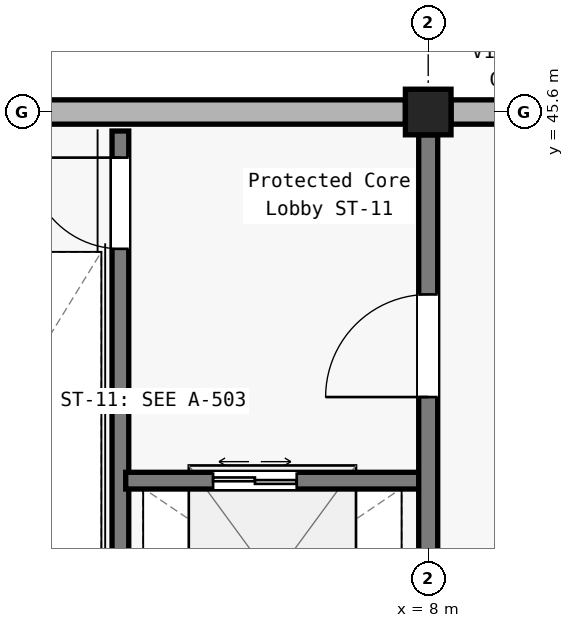
"""IFC4 building model, lengths in metres.
Left out: names, types, materials, properties, quantities, classifications, styles, units other than length and angle.
Written with IfcOpenShell. Run it as: python <this file> out.ifc"""

import sys

from ifc_helpers import new_model, si_unit, direction, frame, frame_2d, origin, origin_2d, place, context, subcontext, project, spatial, rectangle, extrude, element, fill, save


model = new_model("IFC4")
c1 = context("Model", 3, precision=1e-05, world=origin(), true_north=direction((0.0, 1.0)))
c2 = subcontext(c1, "Body", "Model", "MODEL_VIEW")
j1 = project(units=[si_unit("LENGTHUNIT", "METRE"), si_unit("PLANEANGLEUNIT", "RADIAN")], contexts=[c1])
p1 = place(None, origin())
s1 = spatial("IfcSite", under=j1, at=p1, CompositionType="ELEMENT")
p2 = place(p1, origin())
s2 = spatial("IfcBuilding", under=s1, at=p2, CompositionType="ELEMENT")
p3 = place(p2, frame((0.0, 0.0, 19.8)))
s3 = spatial("IfcBuildingStorey", under=s2, at=p3, CompositionType="ELEMENT", Elevation=19.8)
p4 = place(p3, frame((8.0, 45.6, 0.0), z_axis=(0.0, 0.0, 1.0), x_axis=(1.0, 0.0, 0.0)))
e1 = element("IfcColumn", 1, at=p4, inside=s3, PredefinedType="COLUMN", context=c2, shape_type="SweptSolid", body=[
    extrude(rectangle(XDim=0.6, YDim=0.6, at=origin_2d()), origin(), (0.0, 0.0, 1.0), 7.0),
])
for number, where, z_axis, x_axis in (
    (2, (0.25, 45.6, 0.0), (0.0, 0.0, 1.0), (1.0, 0.0, 0.0)),
    (3, (8.3, 45.6, 0.0), (0.0, 0.0, 1.0), (1.0, 0.0, 0.0)),
):
    element("IfcWall", number, at=place(p3, frame(where, z_axis=z_axis, x_axis=x_axis)), inside=s3, PredefinedType="SOLIDWALL", context=c2, shape_type="SweptSolid", body=[
        extrude(rectangle(XDim=7.45, YDim=0.32, at=frame_2d((3.725, 0.0))), origin(), (0.0, 0.0, 1.0), 6.05),
    ])
p5 = place(p3, frame((3.95, 38.25, 0.0), z_axis=(0.0, 0.0, 1.0), x_axis=(0.0, 1.0, 0.0)))
e4 = element("IfcWall", 4, at=p5, inside=s3, PredefinedType="SOLIDWALL", context=c2, shape_type="SweptSolid", body=[
    extrude(rectangle(XDim=7.1, YDim=0.22, at=frame_2d((3.55, 0.0))), origin(), (0.0, 0.0, 1.0), 4.54),
])
p6 = place(p5, frame((5.55, 0.0, 0.0)))
e5 = element("IfcOpeningElement", 5, at=p6, cuts=e4, PredefinedType="OPENING", context=c2, shape_type="SweptSolid", body=[
    extrude(rectangle(XDim=1.2, YDim=2.15, at=frame_2d((0.6, 1.075))), frame((0.0, 0.12, 0.0), z_axis=(0.0, -1.0, 0.0), x_axis=(1.0, 0.0, 0.0)), (0.0, 0.0, 1.0), 0.24),
])
p7 = place(p3, frame((4.02, 40.75, 0.0), z_axis=(0.0, 0.0, 1.0), x_axis=(1.0, 0.0, 0.0)))
e6 = element("IfcWall", 6, at=p7, inside=s3, PredefinedType="SOLIDWALL", context=c2, shape_type="SweptSolid", body=[
    extrude(rectangle(XDim=3.93, YDim=0.22, at=frame_2d((1.965, 0.0))), origin(), (0.0, 0.0, 1.0), 4.54),
])
p8 = place(p7, frame((1.15, 0.0, 0.0)))
e7 = element("IfcOpeningElement", 7, at=p8, cuts=e6, PredefinedType="OPENING", context=c2, shape_type="SweptSolid", body=[
    extrude(rectangle(XDim=1.1, YDim=2.2, at=frame_2d((0.55, 1.1))), frame((0.0, 0.12, 0.0), z_axis=(0.0, -1.0, 0.0), x_axis=(1.0, 0.0, 0.0)), (0.0, 0.0, 1.0), 0.24),
])
p9 = place(p3, frame((8.0, 38.375, 0.0), z_axis=(0.0, 0.0, 1.0), x_axis=(0.0, 1.0, 0.0)))
e8 = element("IfcWall", 8, at=p9, inside=s3, PredefinedType="SOLIDWALL", context=c2, shape_type="SweptSolid", body=[
    extrude(rectangle(XDim=6.925, YDim=0.25, at=frame_2d((3.462, 0.0))), origin(), (0.0, 0.0, 1.0), 4.54),
])
p10 = place(p9, frame((3.475, 0.0, 0.0)))
e9 = element("IfcOpeningElement", 9, at=p10, cuts=e8, PredefinedType="OPENING", context=c2, shape_type="SweptSolid", body=[
    extrude(rectangle(XDim=1.35, YDim=2.2, at=frame_2d((0.675, 1.1))), frame((0.0, 0.135, 0.0), z_axis=(0.0, -1.0, 0.0), x_axis=(1.0, 0.0, 0.0)), (0.0, 0.0, 1.0), 0.27),
])
p11 = place(p6, origin())
e10 = element("IfcDoor", 10, at=p11, inside=s3, OperationType="SINGLE_SWING_RIGHT", PredefinedType="DOOR", context=c2, shape_type="SweptSolid", body=[
    extrude(rectangle(XDim=1.2, YDim=2.15, at=frame_2d((0.6, 1.075))), frame((0.0, 0.025, 0.0), z_axis=(0.0, -1.0, 0.0), x_axis=(1.0, 0.0, 0.0)), (0.0, 0.0, 1.0), 0.05),
])
fill(e5, e10)
p12 = place(p8, origin())
e11 = element("IfcDoor", 11, at=p12, inside=s3, OperationType="DOUBLE_DOOR_SLIDING", PredefinedType="DOOR", context=c2, shape_type="SweptSolid", body=[
    extrude(rectangle(XDim=1.1, YDim=2.2, at=frame_2d((0.55, 1.1))), frame((0.0, 0.025, 0.0), z_axis=(0.0, -1.0, 0.0), x_axis=(1.0, 0.0, 0.0)), (0.0, 0.0, 1.0), 0.05),
])
fill(e7, e11)
p13 = place(p10, origin())
e12 = element("IfcDoor", 12, at=p13, inside=s3, OperationType="SINGLE_SWING_LEFT", PredefinedType="DOOR", context=c2, shape_type="SweptSolid", body=[
    extrude(rectangle(XDim=1.35, YDim=2.2, at=frame_2d((0.675, 1.1))), frame((0.0, 0.025, 0.0), z_axis=(0.0, -1.0, 0.0), x_axis=(1.0, 0.0, 0.0)), (0.0, 0.0, 1.0), 0.05),
])
fill(e9, e12)
save(model, sys.argv[1])
